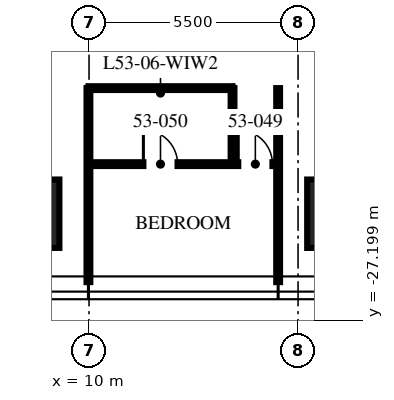
"""IFC4 building model, lengths in metres.
Left out: names, types, materials, properties, quantities, classifications, styles, units other than length and angle.
Written with IfcOpenShell. Run it as: python <this file> out.ifc"""

import sys

from ifc_helpers import new_model, si_unit, direction, frame, frame_2d, origin, origin_2d, place, context, subcontext, project, spatial, rectangle, extrude, element, fill, save


model = new_model("IFC4")
c1 = context("Model", 3, precision=1e-05, world=origin(), true_north=direction((0.0, 1.0)))
c2 = subcontext(c1, "Body", "Model", "MODEL_VIEW")
j1 = project(units=[si_unit("LENGTHUNIT", "METRE"), si_unit("PLANEANGLEUNIT", "RADIAN")], contexts=[c1])
p1 = place(None, origin())
s1 = spatial("IfcSite", under=j1, at=p1, CompositionType="ELEMENT")
p2 = place(p1, origin())
s2 = spatial("IfcBuilding", under=s1, at=p2, CompositionType="ELEMENT")
p3 = place(p2, frame((0.0, 0.0, 214.5)))
s3 = spatial("IfcBuildingStorey", under=s2, at=p3, CompositionType="ELEMENT", Elevation=214.5)
for number, where, z_axis, x_axis in (
    (1, (16.64, -24.4, 0.0), (0.0, 0.0, 1.0), (1.0, 0.0, 0.0)),
    (2, (8.32, -24.4, 0.0), (0.0, 0.0, 1.0), (1.0, 0.0, 0.0)),
):
    element("IfcColumn", number, at=place(p3, frame(where, z_axis=z_axis, x_axis=x_axis)), inside=s3, PredefinedType="COLUMN", context=c2, shape_type="SweptSolid", body=[
        extrude(rectangle(XDim=1.8, YDim=1.8, at=origin_2d()), origin(), (0.0, 0.0, 1.0), 3.75),
    ])
for number, where, z_axis, x_axis in (
    (3, (9.984, -21.095, 0.0), (0.0, 0.0, 1.0), (0.0, -1.0, 0.0)),
    (4, (14.976, -21.095, 0.0), (0.0, 0.0, 1.0), (0.0, -1.0, 0.0)),
):
    element("IfcWall", number, at=place(p3, frame(where, z_axis=z_axis, x_axis=x_axis)), inside=s3, PredefinedType="PARTITIONING", context=c2, shape_type="SweptSolid", body=[
        extrude(rectangle(XDim=5.105, YDim=0.1, at=frame_2d((2.552, 0.0))), origin(), (0.0, 0.0, 1.0), 2.91),
    ])
p4 = place(p3, frame((9.984, -23.095, 0.0), z_axis=(0.0, 0.0, 1.0), x_axis=(1.0, 0.0, 0.0)))
e5 = element("IfcWall", 5, at=p4, inside=s3, PredefinedType="PARTITIONING", context=c2, shape_type="SweptSolid", body=[
    extrude(rectangle(XDim=4.992, YDim=0.1, at=frame_2d((2.496, 0.0))), origin(), (0.0, 0.0, 1.0), 2.81),
])
p5 = place(p4, frame((3.942, 0.0, 0.0)))
e6 = element("IfcOpeningElement", 6, at=p5, cuts=e5, PredefinedType="OPENING", context=c2, shape_type="SweptSolid", body=[
    extrude(rectangle(XDim=0.9, YDim=2.1, at=frame_2d((0.45, 1.05))), frame((0.0, 0.06, 0.0), z_axis=(0.0, -1.0, 0.0), x_axis=(1.0, 0.0, 0.0)), (0.0, 0.0, 1.0), 0.12),
])
p6 = place(p4, frame((1.446, 0.0, 0.0)))
e7 = element("IfcOpeningElement", 7, at=p6, cuts=e5, PredefinedType="OPENING", context=c2, shape_type="SweptSolid", body=[
    extrude(rectangle(XDim=0.9, YDim=2.1, at=frame_2d((0.45, 1.05))), frame((0.0, 0.06, 0.0), z_axis=(0.0, -1.0, 0.0), x_axis=(1.0, 0.0, 0.0)), (0.0, 0.0, 1.0), 0.12),
])
p7 = place(p3, frame((13.776, -21.095, 0.0), z_axis=(0.0, 0.0, 1.0), x_axis=(0.0, -1.0, 0.0)))
e8 = element("IfcWall", 8, at=p7, inside=s3, PredefinedType="PARTITIONING", context=c2, shape_type="SweptSolid", body=[
    extrude(rectangle(XDim=2.0, YDim=0.1, at=frame_2d((1.0, 0.0))), origin(), (0.0, 0.0, 1.0), 3.5),
])
p8 = place(p3, frame((9.984, -21.095, 0.0), z_axis=(0.0, 0.0, 1.0), x_axis=(1.0, 0.0, 0.0)))
e9 = element("IfcWall", 9, at=p8, inside=s3, PredefinedType="PARTITIONING", context=c2, shape_type="SweptSolid", body=[
    extrude(rectangle(XDim=3.792, YDim=0.1, at=frame_2d((1.896, 0.0))), origin(), (0.0, 0.0, 1.0), 2.81),
])
p9 = place(p5, origin())
e10 = element("IfcDoor", 10, at=p9, inside=s3, OperationType="SINGLE_SWING_LEFT", PredefinedType="DOOR", context=c2, shape_type="SweptSolid", body=[
    extrude(rectangle(XDim=0.9, YDim=2.1, at=frame_2d((0.45, 1.05))), frame((0.0, 0.025, 0.0), z_axis=(0.0, -1.0, 0.0), x_axis=(1.0, 0.0, 0.0)), (0.0, 0.0, 1.0), 0.05),
])
fill(e6, e10)
p10 = place(p6, origin())
e11 = element("IfcDoor", 11, at=p10, inside=s3, OperationType="SINGLE_SWING_LEFT", PredefinedType="DOOR", context=c2, shape_type="SweptSolid", body=[
    extrude(rectangle(XDim=0.9, YDim=2.1, at=frame_2d((0.45, 1.05))), frame((0.0, 0.025, 0.0), z_axis=(0.0, -1.0, 0.0), x_axis=(1.0, 0.0, 0.0)), (0.0, 0.0, 1.0), 0.05),
])
fill(e7, e11)
save(model, sys.argv[1])
